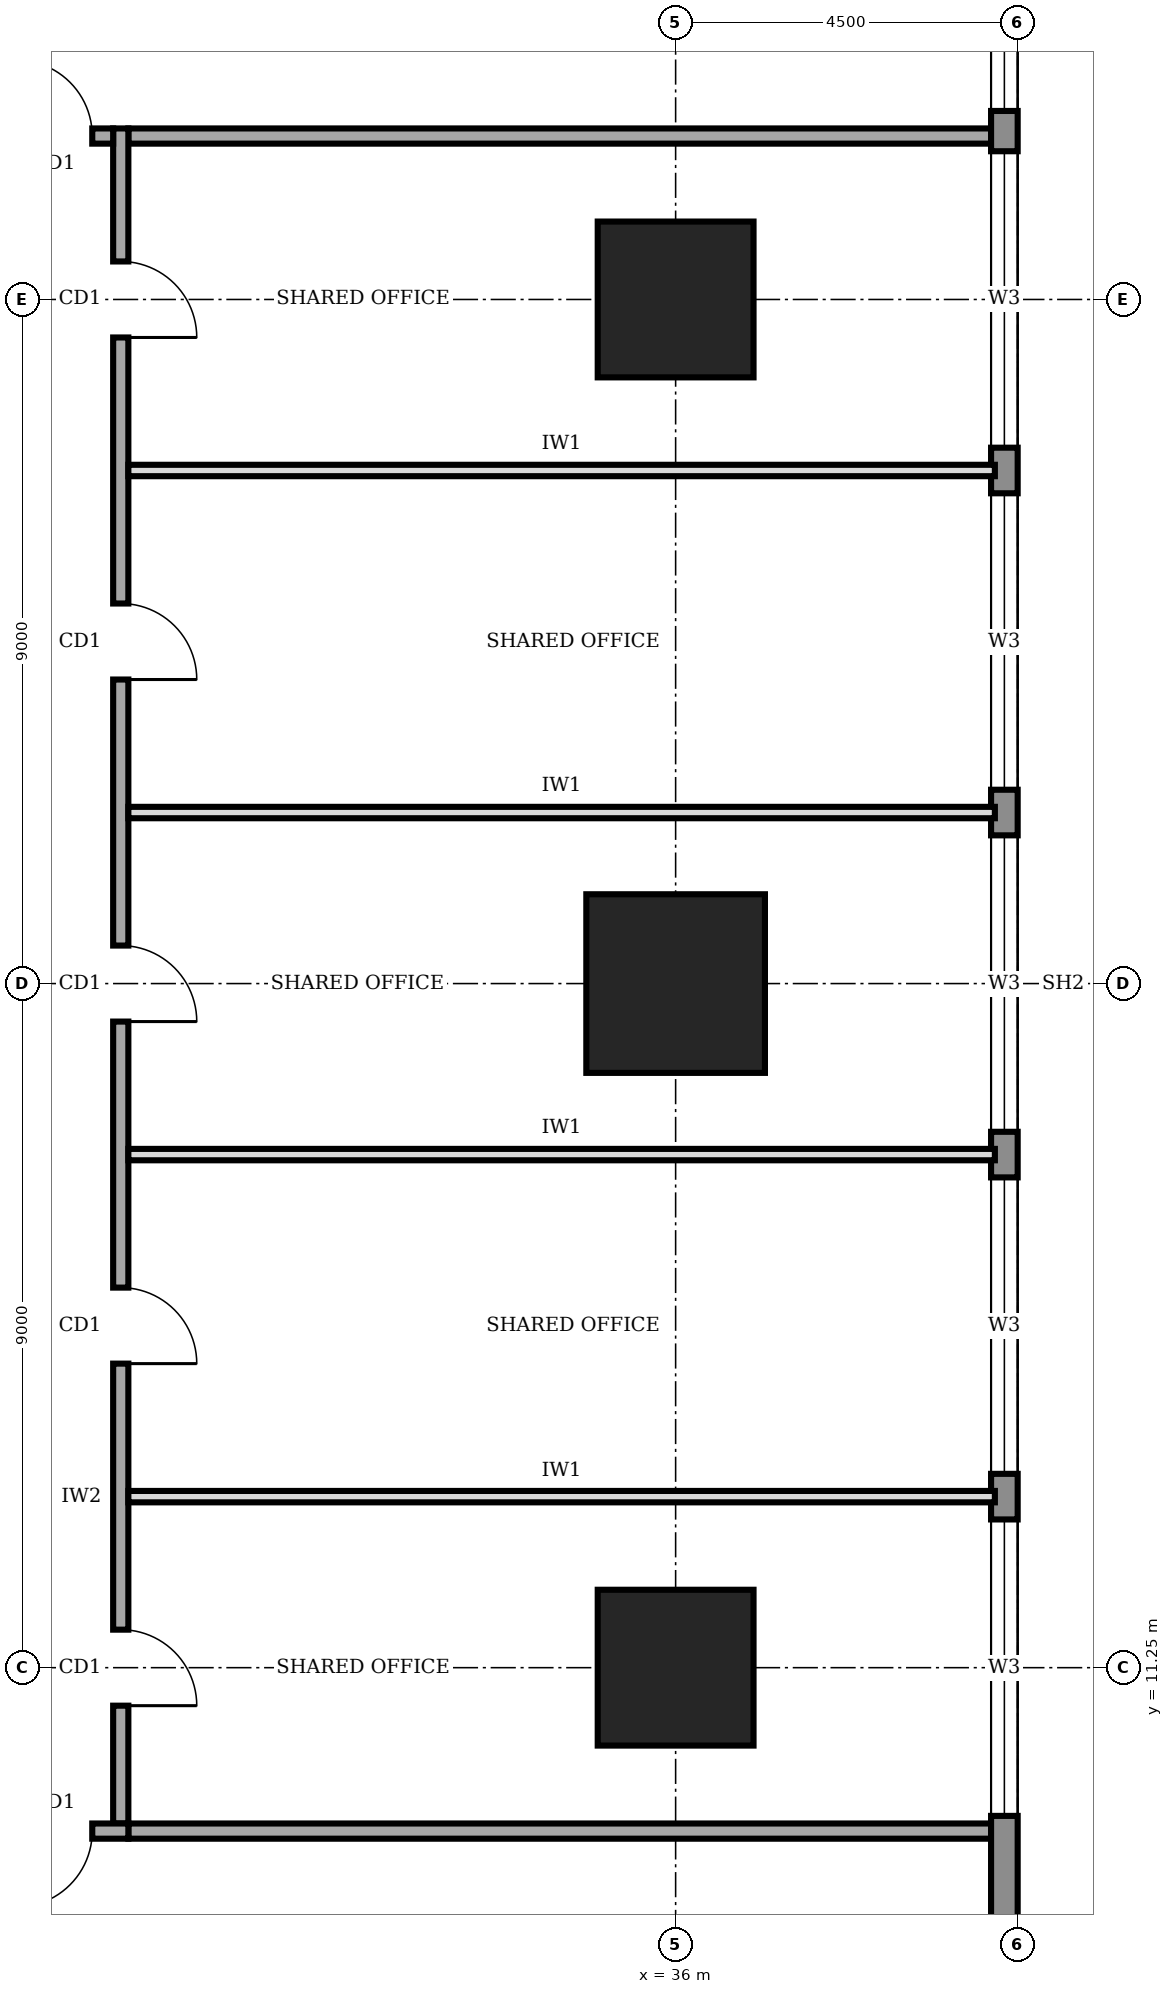
"""IFC4 building model, lengths in metres.
Left out: names, types, materials, properties, quantities, classifications, styles, units other than length and angle.
Written with IfcOpenShell. Run it as: python <this file> out.ifc"""

import sys

from ifc_helpers import new_model, si_unit, direction, frame, frame_2d, origin, origin_2d, place, context, subcontext, project, spatial, rectangle, extrude, element, fill, save


model = new_model("IFC4")
c1 = context("Model", 3, precision=1e-05, world=origin(), true_north=direction((0.0, 1.0)))
c2 = subcontext(c1, "Body", "Model", "MODEL_VIEW")
j1 = project(units=[si_unit("LENGTHUNIT", "METRE"), si_unit("PLANEANGLEUNIT", "RADIAN")], contexts=[c1])
p1 = place(None, origin())
s1 = spatial("IfcSite", under=j1, at=p1, CompositionType="ELEMENT")
p2 = place(p1, origin())
s2 = spatial("IfcBuilding", under=s1, at=p2, CompositionType="ELEMENT")
p3 = place(p2, frame((0.0, 0.0, 177.0)))
s3 = spatial("IfcBuildingStorey", under=s2, at=p3, CompositionType="ELEMENT", Elevation=177.0)
p4 = place(p3, frame((36.0, 11.25, 0.0), z_axis=(0.0, 0.0, 1.0), x_axis=(1.0, 0.0, 0.0)))
e1 = element("IfcColumn", 1, at=p4, inside=s3, PredefinedType="COLUMN", context=c2, shape_type="SweptSolid", body=[
    extrude(rectangle(XDim=2.05, YDim=2.05, at=origin_2d()), origin(), (0.0, 0.0, 1.0), 4.0),
])
p5 = place(p3, frame((36.0, 20.25, 0.0), z_axis=(0.0, 0.0, 1.0), x_axis=(1.0, 0.0, 0.0)))
e2 = element("IfcColumn", 2, at=p5, inside=s3, PredefinedType="COLUMN", context=c2, shape_type="SweptSolid", body=[
    extrude(rectangle(XDim=2.35, YDim=2.35, at=origin_2d()), origin(), (0.0, 0.0, 1.0), 4.0),
])
p6 = place(p3, frame((36.0, 29.25, 0.0), z_axis=(0.0, 0.0, 1.0), x_axis=(1.0, 0.0, 0.0)))
e3 = element("IfcColumn", 3, at=p6, inside=s3, PredefinedType="COLUMN", context=c2, shape_type="SweptSolid", body=[
    extrude(rectangle(XDim=2.05, YDim=2.05, at=origin_2d()), origin(), (0.0, 0.0, 1.0), 4.0),
])
p7 = place(p3, frame((40.325, 4.52, 0.0), z_axis=(0.0, 0.0, 1.0), x_axis=(0.0, 1.0, 0.0)))
e4 = element("IfcWall", 4, at=p7, inside=s3, PredefinedType="STANDARD", context=c2, shape_type="SweptSolid", body=[
    extrude(rectangle(XDim=31.46, YDim=0.35, at=frame_2d((15.73, 0.0))), origin(), (0.0, 0.0, 1.0), 3.75),
])
p8 = place(p7, frame((4.78, 0.0, 0.95)))
e5 = element("IfcOpeningElement", 5, at=p8, cuts=e4, PredefinedType="OPENING", context=c2, shape_type="SweptSolid", body=[
    extrude(rectangle(XDim=3.9, YDim=1.8, at=frame_2d((1.95, 0.9))), frame((0.0, 0.185, 0.0), z_axis=(0.0, -1.0, 0.0), x_axis=(1.0, 0.0, 0.0)), (0.0, 0.0, 1.0), 0.37),
])
p9 = place(p7, frame((9.28, 0.0, 0.95)))
e6 = element("IfcOpeningElement", 6, at=p9, cuts=e4, PredefinedType="OPENING", context=c2, shape_type="SweptSolid", body=[
    extrude(rectangle(XDim=3.9, YDim=1.8, at=frame_2d((1.95, 0.9))), frame((0.0, 0.185, 0.0), z_axis=(0.0, -1.0, 0.0), x_axis=(1.0, 0.0, 0.0)), (0.0, 0.0, 1.0), 0.37),
])
p10 = place(p7, frame((13.78, 0.0, 0.95)))
e7 = element("IfcOpeningElement", 7, at=p10, cuts=e4, PredefinedType="OPENING", context=c2, shape_type="SweptSolid", body=[
    extrude(rectangle(XDim=3.9, YDim=1.8, at=frame_2d((1.95, 0.9))), frame((0.0, 0.185, 0.0), z_axis=(0.0, -1.0, 0.0), x_axis=(1.0, 0.0, 0.0)), (0.0, 0.0, 1.0), 0.37),
])
p11 = place(p7, frame((18.28, 0.0, 0.95)))
e8 = element("IfcOpeningElement", 8, at=p11, cuts=e4, PredefinedType="OPENING", context=c2, shape_type="SweptSolid", body=[
    extrude(rectangle(XDim=3.9, YDim=1.8, at=frame_2d((1.95, 0.9))), frame((0.0, 0.185, 0.0), z_axis=(0.0, -1.0, 0.0), x_axis=(1.0, 0.0, 0.0)), (0.0, 0.0, 1.0), 0.37),
])
p12 = place(p7, frame((22.78, 0.0, 0.95)))
e9 = element("IfcOpeningElement", 9, at=p12, cuts=e4, PredefinedType="OPENING", context=c2, shape_type="SweptSolid", body=[
    extrude(rectangle(XDim=3.9, YDim=1.8, at=frame_2d((1.95, 0.9))), frame((0.0, 0.185, 0.0), z_axis=(0.0, -1.0, 0.0), x_axis=(1.0, 0.0, 0.0)), (0.0, 0.0, 1.0), 0.37),
])
p13 = place(p7, frame((27.21, 0.0, 0.95)))
e10 = element("IfcOpeningElement", 10, at=p13, cuts=e4, PredefinedType="OPENING", context=c2, shape_type="SweptSolid", body=[
    extrude(rectangle(XDim=3.9, YDim=1.8, at=frame_2d((1.95, 0.9))), frame((0.0, 0.185, 0.0), z_axis=(0.0, -1.0, 0.0), x_axis=(1.0, 0.0, 0.0)), (0.0, 0.0, 1.0), 0.37),
])
p14 = place(p3, frame((11.9, 9.1, 0.0), z_axis=(0.0, 0.0, 1.0), x_axis=(1.0, 0.0, 0.0)))
e11 = element("IfcWall", 11, at=p14, inside=s3, PredefinedType="SOLIDWALL", context=c2, shape_type="SweptSolid", body=[
    extrude(rectangle(XDim=16.9, YDim=0.2, at=frame_2d((8.45, 0.0))), origin(), (0.0, 0.0, 1.0), 3.75),
])
p15 = place(p14, frame((15.425, 0.0, 0.0)))
e12 = element("IfcOpeningElement", 12, at=p15, cuts=e11, PredefinedType="OPENING", context=c2, shape_type="SweptSolid", body=[
    extrude(rectangle(XDim=1.0, YDim=2.1, at=frame_2d((0.5, 1.05))), frame((0.0, 0.11, 0.0), z_axis=(0.0, -1.0, 0.0), x_axis=(1.0, 0.0, 0.0)), (0.0, 0.0, 1.0), 0.22),
])
p16 = place(p3, frame((28.7, 9.2, 0.0), z_axis=(0.0, 0.0, 1.0), x_axis=(0.0, 1.0, 0.0)))
e13 = element("IfcWall", 13, at=p16, inside=s3, PredefinedType="SOLIDWALL", context=c2, shape_type="SweptSolid", body=[
    extrude(rectangle(XDim=22.3, YDim=0.2, at=frame_2d((11.15, 0.0))), origin(), (0.0, 0.0, 1.0), 3.75),
])
p17 = place(p16, frame((1.55, 0.0, 0.0)))
e14 = element("IfcOpeningElement", 14, at=p17, cuts=e13, PredefinedType="OPENING", context=c2, shape_type="SweptSolid", body=[
    extrude(rectangle(XDim=1.0, YDim=2.1, at=frame_2d((0.5, 1.05))), frame((0.0, 0.11, 0.0), z_axis=(0.0, -1.0, 0.0), x_axis=(1.0, 0.0, 0.0)), (0.0, 0.0, 1.0), 0.22),
])
p18 = place(p16, frame((6.05, 0.0, 0.0)))
e15 = element("IfcOpeningElement", 15, at=p18, cuts=e13, PredefinedType="OPENING", context=c2, shape_type="SweptSolid", body=[
    extrude(rectangle(XDim=1.0, YDim=2.1, at=frame_2d((0.5, 1.05))), frame((0.0, 0.11, 0.0), z_axis=(0.0, -1.0, 0.0), x_axis=(1.0, 0.0, 0.0)), (0.0, 0.0, 1.0), 0.22),
])
p19 = place(p16, frame((10.55, 0.0, 0.0)))
e16 = element("IfcOpeningElement", 16, at=p19, cuts=e13, PredefinedType="OPENING", context=c2, shape_type="SweptSolid", body=[
    extrude(rectangle(XDim=1.0, YDim=2.1, at=frame_2d((0.5, 1.05))), frame((0.0, 0.11, 0.0), z_axis=(0.0, -1.0, 0.0), x_axis=(1.0, 0.0, 0.0)), (0.0, 0.0, 1.0), 0.22),
])
p20 = place(p16, frame((15.05, 0.0, 0.0)))
e17 = element("IfcOpeningElement", 17, at=p20, cuts=e13, PredefinedType="OPENING", context=c2, shape_type="SweptSolid", body=[
    extrude(rectangle(XDim=1.0, YDim=2.1, at=frame_2d((0.5, 1.05))), frame((0.0, 0.11, 0.0), z_axis=(0.0, -1.0, 0.0), x_axis=(1.0, 0.0, 0.0)), (0.0, 0.0, 1.0), 0.22),
])
p21 = place(p16, frame((19.55, 0.0, 0.0)))
e18 = element("IfcOpeningElement", 18, at=p21, cuts=e13, PredefinedType="OPENING", context=c2, shape_type="SweptSolid", body=[
    extrude(rectangle(XDim=1.0, YDim=2.1, at=frame_2d((0.5, 1.05))), frame((0.0, 0.11, 0.0), z_axis=(0.0, -1.0, 0.0), x_axis=(1.0, 0.0, 0.0)), (0.0, 0.0, 1.0), 0.22),
])
p22 = place(p3, frame((28.6, 31.4, 0.0), z_axis=(0.0, 0.0, 1.0), x_axis=(-1.0, 0.0, 0.0)))
e19 = element("IfcWall", 19, at=p22, inside=s3, PredefinedType="SOLIDWALL", context=c2, shape_type="SweptSolid", body=[
    extrude(rectangle(XDim=16.9, YDim=0.2, at=frame_2d((8.45, 0.0))), origin(), (0.0, 0.0, 1.0), 3.75),
])
p23 = place(p22, frame((15.425, 0.0, 0.0)))
e20 = element("IfcOpeningElement", 20, at=p23, cuts=e19, PredefinedType="OPENING", context=c2, shape_type="SweptSolid", body=[
    extrude(rectangle(XDim=1.0, YDim=2.1, at=frame_2d((0.5, 1.05))), frame((0.0, 0.11, 0.0), z_axis=(0.0, -1.0, 0.0), x_axis=(1.0, 0.0, 0.0)), (0.0, 0.0, 1.0), 0.22),
])
p24 = place(p22, frame((12.35, 0.0, 0.0)))
e21 = element("IfcOpeningElement", 21, at=p24, cuts=e19, PredefinedType="OPENING", context=c2, shape_type="SweptSolid", body=[
    extrude(rectangle(XDim=1.0, YDim=2.1, at=frame_2d((0.5, 1.05))), frame((0.0, 0.11, 0.0), z_axis=(0.0, -1.0, 0.0), x_axis=(1.0, 0.0, 0.0)), (0.0, 0.0, 1.0), 0.22),
])
p25 = place(p22, frame((5.6, 0.0, 0.0)))
e22 = element("IfcOpeningElement", 22, at=p25, cuts=e19, PredefinedType="OPENING", context=c2, shape_type="SweptSolid", body=[
    extrude(rectangle(XDim=1.0, YDim=2.1, at=frame_2d((0.5, 1.05))), frame((0.0, 0.11, 0.0), z_axis=(0.0, -1.0, 0.0), x_axis=(1.0, 0.0, 0.0)), (0.0, 0.0, 1.0), 0.22),
])
p26 = place(p22, frame((0.275, 0.0, 0.0)))
e23 = element("IfcOpeningElement", 23, at=p26, cuts=e19, PredefinedType="OPENING", context=c2, shape_type="SweptSolid", body=[
    extrude(rectangle(XDim=1.0, YDim=2.1, at=frame_2d((0.5, 1.05))), frame((0.0, 0.11, 0.0), z_axis=(0.0, -1.0, 0.0), x_axis=(1.0, 0.0, 0.0)), (0.0, 0.0, 1.0), 0.22),
])
for number, where, z_axis, x_axis in (
    (24, (28.8, 9.1, 0.0), (0.0, 0.0, 1.0), (1.0, 0.0, 0.0)),
    (25, (28.8, 31.4, 0.0), (0.0, 0.0, 1.0), (1.0, 0.0, 0.0)),
):
    element("IfcWall", number, at=place(p3, frame(where, z_axis=z_axis, x_axis=x_axis)), inside=s3, PredefinedType="SOLIDWALL", context=c2, shape_type="SweptSolid", body=[
        extrude(rectangle(XDim=11.4, YDim=0.2, at=frame_2d((5.7, 0.0))), origin(), (0.0, 0.0, 1.0), 3.75),
    ])
for number, where, z_axis, x_axis in (
    (26, (28.8, 13.5, 0.0), (0.0, 0.0, 1.0), (1.0, 0.0, 0.0)),
    (27, (28.8, 18.0, 0.0), (0.0, 0.0, 1.0), (1.0, 0.0, 0.0)),
    (28, (28.8, 22.5, 0.0), (0.0, 0.0, 1.0), (1.0, 0.0, 0.0)),
    (29, (28.8, 27.0, 0.0), (0.0, 0.0, 1.0), (1.0, 0.0, 0.0)),
):
    element("IfcWall", number, at=place(p3, frame(where, z_axis=z_axis, x_axis=x_axis)), inside=s3, PredefinedType="PARTITIONING", context=c2, shape_type="SweptSolid", body=[
        extrude(rectangle(XDim=11.4, YDim=0.15, at=frame_2d((5.7, 0.0))), origin(), (0.0, 0.0, 1.0), 3.75),
    ])
p27 = place(p8, origin())
e30 = element("IfcWindow", 30, at=p27, inside=s3, PartitioningType="SINGLE_PANEL", PredefinedType="WINDOW", context=c2, shape_type="SweptSolid", body=[
    extrude(rectangle(XDim=3.9, YDim=1.8, at=frame_2d((1.95, 0.9))), frame((0.0, 0.03, 0.0), z_axis=(0.0, -1.0, 0.0), x_axis=(1.0, 0.0, 0.0)), (0.0, 0.0, 1.0), 0.06),
])
fill(e5, e30)
p28 = place(p9, origin())
e31 = element("IfcWindow", 31, at=p28, inside=s3, PartitioningType="SINGLE_PANEL", PredefinedType="WINDOW", context=c2, shape_type="SweptSolid", body=[
    extrude(rectangle(XDim=3.9, YDim=1.8, at=frame_2d((1.95, 0.9))), frame((0.0, 0.03, 0.0), z_axis=(0.0, -1.0, 0.0), x_axis=(1.0, 0.0, 0.0)), (0.0, 0.0, 1.0), 0.06),
])
fill(e6, e31)
p29 = place(p10, origin())
e32 = element("IfcWindow", 32, at=p29, inside=s3, PartitioningType="SINGLE_PANEL", PredefinedType="WINDOW", context=c2, shape_type="SweptSolid", body=[
    extrude(rectangle(XDim=3.9, YDim=1.8, at=frame_2d((1.95, 0.9))), frame((0.0, 0.03, 0.0), z_axis=(0.0, -1.0, 0.0), x_axis=(1.0, 0.0, 0.0)), (0.0, 0.0, 1.0), 0.06),
])
fill(e7, e32)
p30 = place(p11, origin())
e33 = element("IfcWindow", 33, at=p30, inside=s3, PartitioningType="SINGLE_PANEL", PredefinedType="WINDOW", context=c2, shape_type="SweptSolid", body=[
    extrude(rectangle(XDim=3.9, YDim=1.8, at=frame_2d((1.95, 0.9))), frame((0.0, 0.03, 0.0), z_axis=(0.0, -1.0, 0.0), x_axis=(1.0, 0.0, 0.0)), (0.0, 0.0, 1.0), 0.06),
])
fill(e8, e33)
p31 = place(p12, origin())
e34 = element("IfcWindow", 34, at=p31, inside=s3, PartitioningType="SINGLE_PANEL", PredefinedType="WINDOW", context=c2, shape_type="SweptSolid", body=[
    extrude(rectangle(XDim=3.9, YDim=1.8, at=frame_2d((1.95, 0.9))), frame((0.0, 0.03, 0.0), z_axis=(0.0, -1.0, 0.0), x_axis=(1.0, 0.0, 0.0)), (0.0, 0.0, 1.0), 0.06),
])
fill(e9, e34)
p32 = place(p13, origin())
e35 = element("IfcWindow", 35, at=p32, inside=s3, PartitioningType="SINGLE_PANEL", PredefinedType="WINDOW", context=c2, shape_type="SweptSolid", body=[
    extrude(rectangle(XDim=3.9, YDim=1.8, at=frame_2d((1.95, 0.9))), frame((0.0, 0.03, 0.0), z_axis=(0.0, -1.0, 0.0), x_axis=(1.0, 0.0, 0.0)), (0.0, 0.0, 1.0), 0.06),
])
fill(e10, e35)
p33 = place(p15, frame((1.0, 0.0, 0.0), z_axis=(0.0, 0.0, 1.0), x_axis=(-1.0, 0.0, 0.0)))
e36 = element("IfcDoor", 36, at=p33, inside=s3, OperationType="SINGLE_SWING_RIGHT", PredefinedType="DOOR", context=c2, shape_type="SweptSolid", body=[
    extrude(rectangle(XDim=1.0, YDim=2.1, at=frame_2d((0.5, 1.05))), frame((0.0, 0.025, 0.0), z_axis=(0.0, -1.0, 0.0), x_axis=(1.0, 0.0, 0.0)), (0.0, 0.0, 1.0), 0.05),
])
fill(e12, e36)
p34 = place(p17, frame((1.0, 0.0, 0.0), z_axis=(0.0, 0.0, 1.0), x_axis=(-1.0, 0.0, 0.0)))
e37 = element("IfcDoor", 37, at=p34, inside=s3, OperationType="SINGLE_SWING_RIGHT", PredefinedType="DOOR", context=c2, shape_type="SweptSolid", body=[
    extrude(rectangle(XDim=1.0, YDim=2.1, at=frame_2d((0.5, 1.05))), frame((0.0, 0.025, 0.0), z_axis=(0.0, -1.0, 0.0), x_axis=(1.0, 0.0, 0.0)), (0.0, 0.0, 1.0), 0.05),
])
fill(e14, e37)
p35 = place(p18, frame((1.0, 0.0, 0.0), z_axis=(0.0, 0.0, 1.0), x_axis=(-1.0, 0.0, 0.0)))
e38 = element("IfcDoor", 38, at=p35, inside=s3, OperationType="SINGLE_SWING_RIGHT", PredefinedType="DOOR", context=c2, shape_type="SweptSolid", body=[
    extrude(rectangle(XDim=1.0, YDim=2.1, at=frame_2d((0.5, 1.05))), frame((0.0, 0.025, 0.0), z_axis=(0.0, -1.0, 0.0), x_axis=(1.0, 0.0, 0.0)), (0.0, 0.0, 1.0), 0.05),
])
fill(e15, e38)
p36 = place(p19, frame((1.0, 0.0, 0.0), z_axis=(0.0, 0.0, 1.0), x_axis=(-1.0, 0.0, 0.0)))
e39 = element("IfcDoor", 39, at=p36, inside=s3, OperationType="SINGLE_SWING_RIGHT", PredefinedType="DOOR", context=c2, shape_type="SweptSolid", body=[
    extrude(rectangle(XDim=1.0, YDim=2.1, at=frame_2d((0.5, 1.05))), frame((0.0, 0.025, 0.0), z_axis=(0.0, -1.0, 0.0), x_axis=(1.0, 0.0, 0.0)), (0.0, 0.0, 1.0), 0.05),
])
fill(e16, e39)
p37 = place(p20, frame((1.0, 0.0, 0.0), z_axis=(0.0, 0.0, 1.0), x_axis=(-1.0, 0.0, 0.0)))
e40 = element("IfcDoor", 40, at=p37, inside=s3, OperationType="SINGLE_SWING_RIGHT", PredefinedType="DOOR", context=c2, shape_type="SweptSolid", body=[
    extrude(rectangle(XDim=1.0, YDim=2.1, at=frame_2d((0.5, 1.05))), frame((0.0, 0.025, 0.0), z_axis=(0.0, -1.0, 0.0), x_axis=(1.0, 0.0, 0.0)), (0.0, 0.0, 1.0), 0.05),
])
fill(e17, e40)
p38 = place(p21, frame((1.0, 0.0, 0.0), z_axis=(0.0, 0.0, 1.0), x_axis=(-1.0, 0.0, 0.0)))
e41 = element("IfcDoor", 41, at=p38, inside=s3, OperationType="SINGLE_SWING_RIGHT", PredefinedType="DOOR", context=c2, shape_type="SweptSolid", body=[
    extrude(rectangle(XDim=1.0, YDim=2.1, at=frame_2d((0.5, 1.05))), frame((0.0, 0.025, 0.0), z_axis=(0.0, -1.0, 0.0), x_axis=(1.0, 0.0, 0.0)), (0.0, 0.0, 1.0), 0.05),
])
fill(e18, e41)
p39 = place(p26, frame((1.0, 0.0, 0.0), z_axis=(0.0, 0.0, 1.0), x_axis=(-1.0, 0.0, 0.0)))
e42 = element("IfcDoor", 42, at=p39, inside=s3, OperationType="SINGLE_SWING_LEFT", PredefinedType="DOOR", context=c2, shape_type="SweptSolid", body=[
    extrude(rectangle(XDim=1.0, YDim=2.1, at=frame_2d((0.5, 1.05))), frame((0.0, 0.025, 0.0), z_axis=(0.0, -1.0, 0.0), x_axis=(1.0, 0.0, 0.0)), (0.0, 0.0, 1.0), 0.05),
])
fill(e23, e42)
save(model, sys.argv[1])
